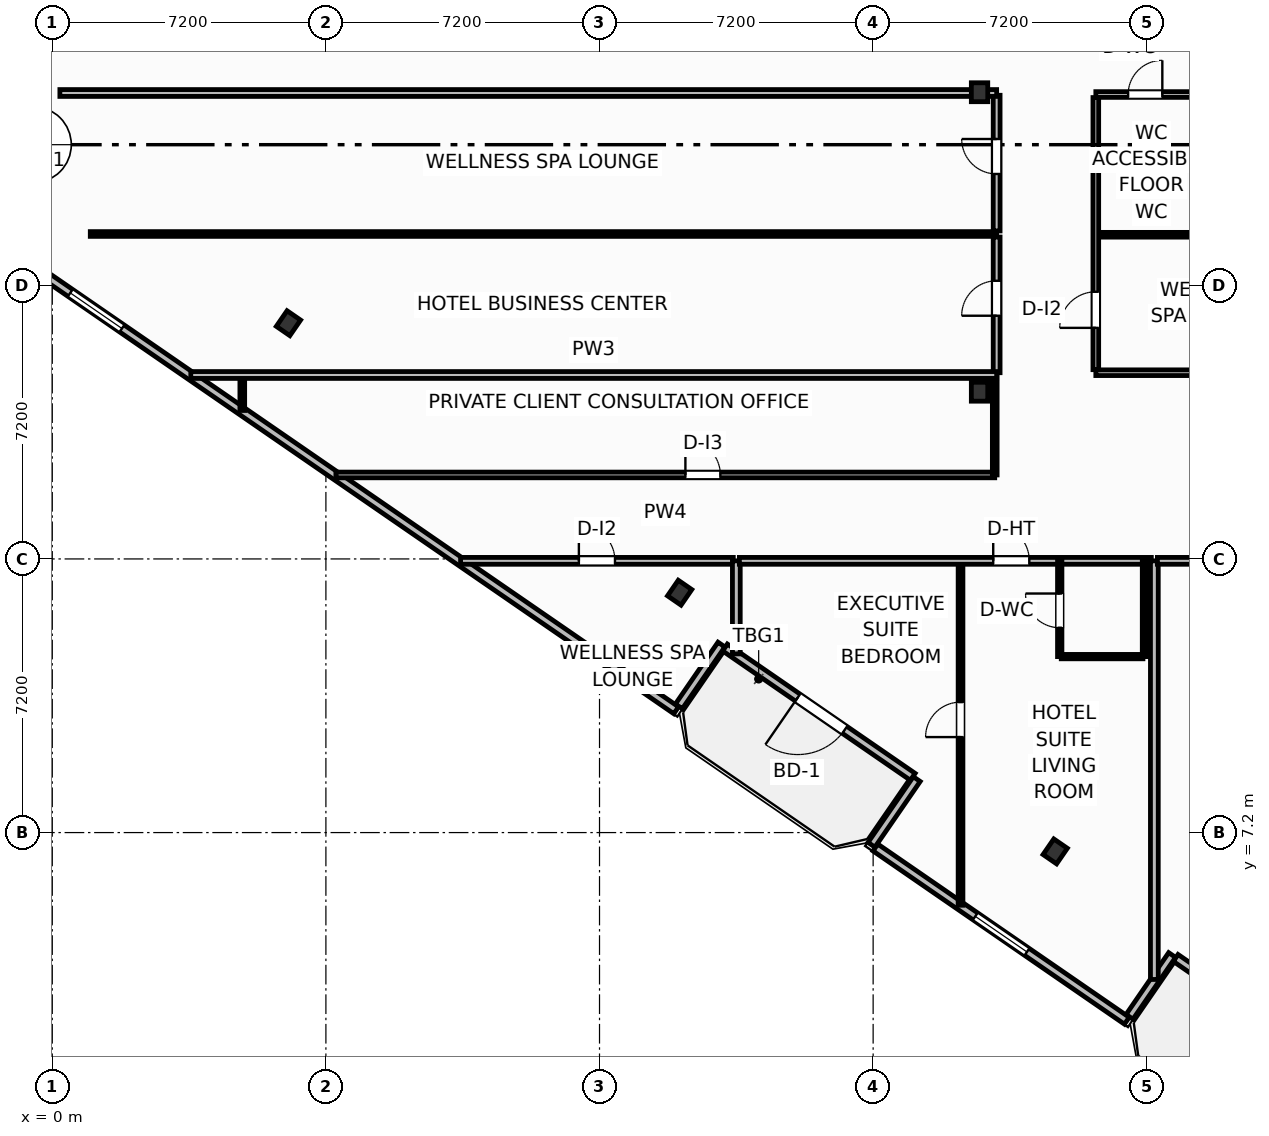
"""IFC4 building model, lengths in metres.
Left out: names, types, materials, properties, quantities, classifications, styles, units other than length and angle.
Written with IfcOpenShell. Run it as: python <this file> out.ifc"""

import sys

from ifc_helpers import new_model, si_unit, direction, frame, frame_2d, origin, origin_2d, place, context, subcontext, project, spatial, rectangle, i_section, extrude, element, fill, save


model = new_model("IFC4")
c1 = context("Model", 3, precision=1e-05, world=origin(), true_north=direction((0.0, 1.0)))
c2 = subcontext(c1, "Body", "Model", "MODEL_VIEW")
j1 = project(units=[si_unit("LENGTHUNIT", "METRE"), si_unit("PLANEANGLEUNIT", "RADIAN")], contexts=[c1])
p1 = place(None, origin())
s1 = spatial("IfcSite", under=j1, at=p1, CompositionType="ELEMENT")
p2 = place(p1, origin())
s2 = spatial("IfcBuilding", under=s1, at=p2, CompositionType="ELEMENT")
p3 = place(p2, frame((0.0, 0.0, 45.5)))
s3 = spatial("IfcBuildingStorey", under=s2, at=p3, CompositionType="ELEMENT", Elevation=45.5)
for number, where, z_axis, x_axis in (
    (1, (24.4, 18.8, 0.0), (0.0, 0.0, 1.0), (1.0, 0.0, 0.0)),
    (2, (24.4, 26.68, 0.0), (0.0, 0.0, 1.0), (1.0, 0.0, 0.0)),
    (3, (6.215, 20.603, 0.0), (0.0, 0.0, 1.0), (0.824, -0.567, 0.0)),
    (4, (16.509, 13.512, 0.0), (0.0, 0.0, 1.0), (0.824, -0.567, 0.0)),
    (5, (26.391, 6.705, 0.0), (0.0, 0.0, 1.0), (0.824, -0.567, 0.0)),
):
    element("IfcColumn", number, at=place(p3, frame(where, z_axis=z_axis, x_axis=x_axis)), inside=s3, PredefinedType="COLUMN", context=c2, shape_type="SweptSolid", body=[
        extrude(i_section(OverallWidth=0.432, OverallDepth=0.498, WebThickness=0.056, FlangeThickness=0.089, FilletRadius=0.025, at=origin_2d()), origin(), (0.0, 0.0, 1.0), 3.7),
    ])
p4 = place(p3, frame((22.643, 8.667, 0.0), z_axis=(0.0, 0.0, 1.0), x_axis=(-0.823534636215, 0.567265989598, 0.0)))
e6 = element("IfcWall", 6, at=p4, inside=s3, PredefinedType="SOLIDWALL", context=c2, shape_type="SweptSolid", body=[
    extrude(rectangle(XDim=6.0, YDim=0.22, at=frame_2d((3.0, 0.0))), origin(), (0.0, 0.0, 1.0), 2.73),
])
p5 = place(p4, frame((2.176, 0.0, 0.0)))
e7 = element("IfcOpeningElement", 7, at=p5, cuts=e6, PredefinedType="OPENING", context=c2, shape_type="SweptSolid", body=[
    extrude(rectangle(XDim=1.5, YDim=2.25, at=frame_2d((0.75, 1.125))), frame((0.0, 0.12, 0.0), z_axis=(0.0, -1.0, 0.0), x_axis=(1.0, 0.0, 0.0)), (0.0, 0.0, 1.0), 0.24),
])
p6 = place(p3, frame((34.502, 0.499, 0.0), z_axis=(0.0, 0.0, 1.0), x_axis=(-0.823534636215, 0.567265989598, 0.0)))
e8 = element("IfcWall", 8, at=p6, inside=s3, PredefinedType="SOLIDWALL", context=c2, shape_type="SweptSolid", body=[
    extrude(rectangle(XDim=6.0, YDim=0.22, at=frame_2d((3.0, 0.0))), origin(), (0.0, 0.0, 1.0), 2.73),
])
p7 = place(p6, frame((3.212, 0.0, 0.0)))
e9 = element("IfcOpeningElement", 9, at=p7, cuts=e8, PredefinedType="OPENING", context=c2, shape_type="SweptSolid", body=[
    extrude(rectangle(XDim=1.5, YDim=2.25, at=frame_2d((0.75, 1.125))), frame((0.0, 0.12, 0.0), z_axis=(0.0, -1.0, 0.0), x_axis=(1.0, 0.0, 0.0)), (0.0, 0.0, 1.0), 0.24),
])
p8 = place(p6, frame((0.55, 0.0, 0.75)))
e10 = element("IfcOpeningElement", 10, at=p8, cuts=e8, PredefinedType="OPENING", context=c2, shape_type="SweptSolid", body=[
    extrude(rectangle(XDim=1.65, YDim=1.65, at=frame_2d((0.825, 0.825))), frame((0.0, 0.12, 0.0), z_axis=(0.0, -1.0, 0.0), x_axis=(1.0, 0.0, 0.0)), (0.0, 0.0, 1.0), 0.24),
])
p9 = place(p3, frame((-2.728, 23.605, 0.0), z_axis=(0.0, 0.0, 1.0), x_axis=(0.823535075462, -0.567265351915, 0.0)))
e11 = element("IfcWall", 11, at=p9, inside=s3, PredefinedType="SOLIDWALL", context=c2, shape_type="SweptSolid", body=[
    extrude(rectangle(XDim=23.247, YDim=0.22, at=frame_2d((11.624, 0.0))), origin(), (0.0, 0.0, 1.0), 2.73),
])
p10 = place(p9, frame((3.887, 0.0, 0.8)))
e12 = element("IfcOpeningElement", 12, at=p10, cuts=e11, PredefinedType="OPENING", context=c2, shape_type="SweptSolid", body=[
    extrude(rectangle(XDim=1.65, YDim=1.65, at=frame_2d((0.825, 0.825))), frame((0.0, 0.12, 0.0), z_axis=(0.0, -1.0, 0.0), x_axis=(1.0, 0.0, 0.0)), (0.0, 0.0, 1.0), 0.24),
])
p11 = place(p3, frame((16.488, 10.521, 0.0), z_axis=(0.0, 0.0, 1.0), x_axis=(0.567131976434, 0.823626930902, 0.0)))
e13 = element("IfcWall", 13, at=p11, inside=s3, PredefinedType="SOLIDWALL", context=c2, shape_type="SweptSolid", body=[
    extrude(rectangle(XDim=1.975, YDim=0.22, at=frame_2d((0.988, 0.0))), origin(), (0.0, 0.0, 1.0), 2.73),
])
p12 = place(p3, frame((22.747, 8.607, 0.0), z_axis=(0.0, 0.0, 1.0), x_axis=(-0.567219383419, -0.823566737474, 0.0)))
e14 = element("IfcWall", 14, at=p12, inside=s3, PredefinedType="SOLIDWALL", context=c2, shape_type="SweptSolid", body=[
    extrude(rectangle(XDim=2.1, YDim=0.22, at=frame_2d((1.05, 0.0))), origin(), (0.0, 0.0, 1.0), 2.73),
])
p13 = place(p3, frame((21.659, 6.807, 0.0), z_axis=(0.0, 0.0, 1.0), x_axis=(0.823535360023, -0.567264938799, 0.0)))
e15 = element("IfcWall", 15, at=p13, inside=s3, PredefinedType="SOLIDWALL", context=c2, shape_type="SweptSolid", body=[
    extrude(rectangle(XDim=8.035, YDim=0.22, at=frame_2d((4.018, 0.0))), origin(), (0.0, 0.0, 1.0), 2.73),
])
p14 = place(p13, frame((3.192, 0.0, 0.8)))
e16 = element("IfcOpeningElement", 16, at=p14, cuts=e15, PredefinedType="OPENING", context=c2, shape_type="SweptSolid", body=[
    extrude(rectangle(XDim=1.65, YDim=1.65, at=frame_2d((0.825, 0.825))), frame((0.0, 0.12, 0.0), z_axis=(0.0, -1.0, 0.0), x_axis=(1.0, 0.0, 0.0)), (0.0, 0.0, 1.0), 0.24),
])
p15 = place(p3, frame((28.347, 2.352, 0.0), z_axis=(0.0, 0.0, 1.0), x_axis=(0.567215821234, 0.823569190865, 0.0)))
e17 = element("IfcWall", 17, at=p15, inside=s3, PredefinedType="SOLIDWALL", context=c2, shape_type="SweptSolid", body=[
    extrude(rectangle(XDim=1.975, YDim=0.22, at=frame_2d((0.988, 0.0))), origin(), (0.0, 0.0, 1.0), 2.73),
])
p16 = place(p3, frame((7.463, 16.61, 0.0), z_axis=(0.0, 0.0, 1.0), x_axis=(1.0, 0.0, 0.0)))
e18 = element("IfcWall", 18, at=p16, inside=s3, PredefinedType="PARTITIONING", context=c2, shape_type="SweptSolid", body=[
    extrude(rectangle(XDim=17.337, YDim=0.15, at=frame_2d((8.668, 0.0))), origin(), (0.0, 0.0, 1.0), 3.45),
])
p17 = place(p16, frame((9.197, 0.0, 0.0)))
e19 = element("IfcOpeningElement", 19, at=p17, cuts=e18, PredefinedType="OPENING", context=c2, shape_type="SweptSolid", body=[
    extrude(rectangle(XDim=0.92, YDim=2.05, at=frame_2d((0.46, 1.025))), frame((0.0, 0.085, 0.0), z_axis=(0.0, -1.0, 0.0), x_axis=(1.0, 0.0, 0.0)), (0.0, 0.0, 1.0), 0.17),
])
p18 = place(p3, frame((5.0, 18.306, 0.0), z_axis=(0.0, 0.0, 1.0), x_axis=(0.0, 1.0, 0.0)))
e20 = element("IfcWall", 20, at=p18, inside=s3, PredefinedType="PARTITIONING", context=c2, shape_type="SweptSolid", body=[
    extrude(rectangle(XDim=0.934, YDim=0.125, at=frame_2d((0.467, 0.0))), origin(), (0.0, 0.0, 1.0), 3.45),
])
p19 = place(p3, frame((24.8, 16.61, 0.0), z_axis=(0.0, 0.0, 1.0), x_axis=(0.0, 1.0, 0.0)))
e21 = element("IfcWall", 21, at=p19, inside=s3, PredefinedType="PARTITIONING", context=c2, shape_type="SweptSolid", body=[
    extrude(rectangle(XDim=2.63, YDim=0.125, at=frame_2d((1.315, 0.0))), origin(), (0.0, 0.0, 1.0), 2.58),
])
p20 = place(p3, frame((10.744, 14.35, 0.0), z_axis=(0.0, 0.0, 1.0), x_axis=(1.0, 0.0, 0.0)))
e22 = element("IfcWall", 22, at=p20, inside=s3, PredefinedType="PARTITIONING", context=c2, shape_type="SweptSolid", body=[
    extrude(rectangle(XDim=7.176, YDim=0.18, at=frame_2d((3.588, 0.0))), origin(), (0.0, 0.0, 1.0), 3.45),
])
p21 = place(p20, frame((3.113, 0.0, 0.0)))
e23 = element("IfcOpeningElement", 23, at=p21, cuts=e22, PredefinedType="OPENING", context=c2, shape_type="SweptSolid", body=[
    extrude(rectangle(XDim=0.95, YDim=2.05, at=frame_2d((0.475, 1.025))), frame((0.0, 0.1, 0.0), z_axis=(0.0, -1.0, 0.0), x_axis=(1.0, 0.0, 0.0)), (0.0, 0.0, 1.0), 0.2),
])
p22 = place(p3, frame((18.0, 11.902, 0.0), z_axis=(0.0, 0.0, 1.0), x_axis=(0.0, 1.0, 0.0)))
e24 = element("IfcWall", 24, at=p22, inside=s3, PredefinedType="PARTITIONING", context=c2, shape_type="SweptSolid", body=[
    extrude(rectangle(XDim=2.448, YDim=0.205, at=frame_2d((1.224, 0.0))), origin(), (0.0, 0.0, 1.0), 3.45),
])
p23 = place(p3, frame((23.9, 5.288, 0.0), z_axis=(0.0, 0.0, 1.0), x_axis=(0.0, 1.0, 0.0)))
e25 = element("IfcWall", 25, at=p23, inside=s3, PredefinedType="PARTITIONING", context=c2, shape_type="SweptSolid", body=[
    extrude(rectangle(XDim=9.062, YDim=0.125, at=frame_2d((4.531, 0.0))), origin(), (0.0, 0.0, 1.0), 3.45),
])
p24 = place(p23, frame((4.425, 0.0, 0.0)))
e26 = element("IfcOpeningElement", 26, at=p24, cuts=e25, PredefinedType="OPENING", context=c2, shape_type="SweptSolid", body=[
    extrude(rectangle(XDim=0.92, YDim=2.05, at=frame_2d((0.46, 1.025))), frame((0.0, 0.073, 0.0), z_axis=(0.0, -1.0, 0.0), x_axis=(1.0, 0.0, 0.0)), (0.0, 0.0, 1.0), 0.145),
])
p25 = place(p3, frame((18.08, 14.35, 0.0), z_axis=(0.0, 0.0, 1.0), x_axis=(1.0, 0.0, 0.0)))
e27 = element("IfcWall", 27, at=p25, inside=s3, PredefinedType="PARTITIONING", context=c2, shape_type="SweptSolid", body=[
    extrude(rectangle(XDim=10.84, YDim=0.18, at=frame_2d((5.42, 0.0))), origin(), (0.0, 0.0, 1.0), 3.45),
])
p26 = place(p25, frame((6.68, 0.0, 0.0)))
e28 = element("IfcOpeningElement", 28, at=p26, cuts=e27, PredefinedType="OPENING", context=c2, shape_type="SweptSolid", body=[
    extrude(rectangle(XDim=0.95, YDim=2.15, at=frame_2d((0.475, 1.075))), frame((0.0, 0.1, 0.0), z_axis=(0.0, -1.0, 0.0), x_axis=(1.0, 0.0, 0.0)), (0.0, 0.0, 1.0), 0.2),
])
p27 = place(p3, frame((26.55, 11.83, 0.0), z_axis=(0.0, 0.0, 1.0), x_axis=(1.0, 0.0, 0.0)))
e29 = element("IfcWall", 29, at=p27, inside=s3, PredefinedType="PARTITIONING", context=c2, shape_type="SweptSolid", body=[
    extrude(rectangle(XDim=2.15, YDim=0.115, at=frame_2d((1.075, 0.0))), origin(), (0.0, 0.0, 1.0), 3.45),
])
p28 = place(p3, frame((26.51, 11.83, 0.0), z_axis=(0.0, 0.0, 1.0), x_axis=(0.0, 1.0, 0.0)))
e30 = element("IfcWall", 30, at=p28, inside=s3, PredefinedType="PARTITIONING", context=c2, shape_type="SweptSolid", body=[
    extrude(rectangle(XDim=2.52, YDim=0.115, at=frame_2d((1.26, 0.0))), origin(), (0.0, 0.0, 1.0), 3.45),
])
p29 = place(p28, frame((0.76, 0.0, 0.0)))
e31 = element("IfcOpeningElement", 31, at=p29, cuts=e30, PredefinedType="OPENING", context=c2, shape_type="SweptSolid", body=[
    extrude(rectangle(XDim=0.9, YDim=2.05, at=frame_2d((0.45, 1.025))), frame((0.0, 0.067, 0.0), z_axis=(0.0, -1.0, 0.0), x_axis=(1.0, 0.0, 0.0)), (0.0, 0.0, 1.0), 0.135),
])
p30 = place(p3, frame((28.74, 11.83, 0.0), z_axis=(0.0, 0.0, 1.0), x_axis=(0.0, 1.0, 0.0)))
e32 = element("IfcWall", 32, at=p30, inside=s3, PredefinedType="PARTITIONING", context=c2, shape_type="SweptSolid", body=[
    extrude(rectangle(XDim=2.52, YDim=0.115, at=frame_2d((1.26, 0.0))), origin(), (0.0, 0.0, 1.0), 3.45),
])
p31 = place(p3, frame((29.0, 3.335, 0.0), z_axis=(0.0, 0.0, 1.0), x_axis=(0.0, 1.0, 0.0)))
e33 = element("IfcWall", 33, at=p31, inside=s3, PredefinedType="PARTITIONING", context=c2, shape_type="SweptSolid", body=[
    extrude(rectangle(XDim=11.015, YDim=0.205, at=frame_2d((5.507, 0.0))), origin(), (0.0, 0.0, 1.0), 3.45),
])
p32 = place(p3, frame((29.08, 14.35, 0.0), z_axis=(0.0, 0.0, 1.0), x_axis=(1.0, 0.0, 0.0)))
e34 = element("IfcWall", 34, at=p32, inside=s3, PredefinedType="PARTITIONING", context=c2, shape_type="SweptSolid", body=[
    extrude(rectangle(XDim=10.84, YDim=0.18, at=frame_2d((5.42, 0.0))), origin(), (0.0, 0.0, 1.0), 3.45),
])
p33 = place(p32, frame((0.926, 0.0, 0.0)))
e35 = element("IfcOpeningElement", 35, at=p33, cuts=e34, PredefinedType="OPENING", context=c2, shape_type="SweptSolid", body=[
    extrude(rectangle(XDim=0.95, YDim=2.15, at=frame_2d((0.475, 1.075))), frame((0.0, 0.1, 0.0), z_axis=(0.0, -1.0, 0.0), x_axis=(1.0, 0.0, 0.0)), (0.0, 0.0, 1.0), 0.2),
])
p34 = place(p3, frame((24.85, 19.3, 0.0), z_axis=(0.0, 0.0, 1.0), x_axis=(0.0, 1.0, 0.0)))
e36 = element("IfcWall", 36, at=p34, inside=s3, PredefinedType="PARTITIONING", context=c2, shape_type="SweptSolid", body=[
    extrude(rectangle(XDim=3.57, YDim=0.18, at=frame_2d((1.785, 0.0))), origin(), (0.0, 0.0, 1.0), 3.45),
])
p35 = place(p34, frame((1.5, 0.0, 0.0)))
e37 = element("IfcOpeningElement", 37, at=p35, cuts=e36, PredefinedType="OPENING", context=c2, shape_type="SweptSolid", body=[
    extrude(rectangle(XDim=0.92, YDim=2.05, at=frame_2d((0.46, 1.025))), frame((0.0, 0.1, 0.0), z_axis=(0.0, -1.0, 0.0), x_axis=(1.0, 0.0, 0.0)), (0.0, 0.0, 1.0), 0.2),
])
p36 = place(p3, frame((24.85, 23.03, 0.0), z_axis=(0.0, 0.0, 1.0), x_axis=(0.0, 1.0, 0.0)))
e38 = element("IfcWall", 38, at=p36, inside=s3, PredefinedType="PARTITIONING", context=c2, shape_type="SweptSolid", body=[
    extrude(rectangle(XDim=3.57, YDim=0.18, at=frame_2d((1.785, 0.0))), origin(), (0.0, 0.0, 1.0), 3.45),
])
p37 = place(p36, frame((1.5, 0.0, 0.0)))
e39 = element("IfcOpeningElement", 39, at=p37, cuts=e38, PredefinedType="OPENING", context=c2, shape_type="SweptSolid", body=[
    extrude(rectangle(XDim=0.92, YDim=2.05, at=frame_2d((0.46, 1.025))), frame((0.0, 0.1, 0.0), z_axis=(0.0, -1.0, 0.0), x_axis=(1.0, 0.0, 0.0)), (0.0, 0.0, 1.0), 0.2),
])
p38 = place(p3, frame((1.0, 22.95, 0.0), z_axis=(0.0, 0.0, 1.0), x_axis=(1.0, 0.0, 0.0)))
e40 = element("IfcWall", 40, at=p38, inside=s3, PredefinedType="PARTITIONING", context=c2, shape_type="SweptSolid", body=[
    extrude(rectangle(XDim=23.85, YDim=0.125, at=frame_2d((11.925, 0.0))), origin(), (0.0, 0.0, 1.0), 3.45),
])
p39 = place(p3, frame((3.645, 19.24, 0.0), z_axis=(0.0, 0.0, 1.0), x_axis=(1.0, 0.0, 0.0)))
e41 = element("IfcWall", 41, at=p39, inside=s3, PredefinedType="PARTITIONING", context=c2, shape_type="SweptSolid", body=[
    extrude(rectangle(XDim=21.205, YDim=0.18, at=frame_2d((10.603, 0.0))), origin(), (0.0, 0.0, 1.0), 2.58),
])
p40 = place(p3, frame((0.2, 26.66, 0.0), z_axis=(0.0, 0.0, 1.0), x_axis=(1.0, 0.0, 0.0)))
e42 = element("IfcWall", 42, at=p40, inside=s3, PredefinedType="PARTITIONING", context=c2, shape_type="SweptSolid", body=[
    extrude(rectangle(XDim=24.65, YDim=0.18, at=frame_2d((12.325, 0.0))), origin(), (0.0, 0.0, 1.0), 2.662),
])
p41 = place(p3, frame((27.46, 19.3, 0.0), z_axis=(0.0, 0.0, 1.0), x_axis=(1.0, 0.0, 0.0)))
e43 = element("IfcWall", 43, at=p41, inside=s3, PredefinedType="PARTITIONING", context=c2, shape_type="SweptSolid", body=[
    extrude(rectangle(XDim=6.1, YDim=0.15, at=frame_2d((3.05, 0.0))), origin(), (0.0, 0.0, 1.0), 2.662),
])
p42 = place(p3, frame((27.46, 26.62, 0.0), z_axis=(0.0, 0.0, 1.0), x_axis=(1.0, 0.0, 0.0)))
e44 = element("IfcWall", 44, at=p42, inside=s3, PredefinedType="PARTITIONING", context=c2, shape_type="SweptSolid", body=[
    extrude(rectangle(XDim=6.1, YDim=0.15, at=frame_2d((3.05, 0.0))), origin(), (0.0, 0.0, 1.0), 2.662),
])
p43 = place(p42, frame((0.85, 0.0, 0.0)))
e45 = element("IfcOpeningElement", 45, at=p43, cuts=e44, PredefinedType="OPENING", context=c2, shape_type="SweptSolid", body=[
    extrude(rectangle(XDim=0.9, YDim=2.05, at=frame_2d((0.45, 1.025))), frame((0.0, 0.085, 0.0), z_axis=(0.0, -1.0, 0.0), x_axis=(1.0, 0.0, 0.0)), (0.0, 0.0, 1.0), 0.17),
])
p44 = place(p42, frame((3.85, 0.0, 0.0)))
e46 = element("IfcOpeningElement", 46, at=p44, cuts=e44, PredefinedType="OPENING", context=c2, shape_type="SweptSolid", body=[
    extrude(rectangle(XDim=0.92, YDim=2.05, at=frame_2d((0.46, 1.025))), frame((0.0, 0.085, 0.0), z_axis=(0.0, -1.0, 0.0), x_axis=(1.0, 0.0, 0.0)), (0.0, 0.0, 1.0), 0.17),
])
p45 = place(p3, frame((27.52, 22.93, 0.0), z_axis=(0.0, 0.0, 1.0), x_axis=(1.0, 0.0, 0.0)))
e47 = element("IfcWall", 47, at=p45, inside=s3, PredefinedType="PARTITIONING", context=c2, shape_type="SweptSolid", body=[
    extrude(rectangle(XDim=6.0, YDim=0.125, at=frame_2d((3.0, 0.0))), origin(), (0.0, 0.0, 1.0), 3.45),
])
p46 = place(p3, frame((27.46, 19.38, 0.0), z_axis=(0.0, 0.0, 1.0), x_axis=(0.0, 1.0, 0.0)))
e48 = element("IfcWall", 48, at=p46, inside=s3, PredefinedType="PARTITIONING", context=c2, shape_type="SweptSolid", body=[
    extrude(rectangle(XDim=7.16, YDim=0.15, at=frame_2d((3.58, 0.0))), origin(), (0.0, 0.0, 1.0), 3.45),
])
p47 = place(p46, frame((1.1, 0.0, 0.0)))
e49 = element("IfcOpeningElement", 49, at=p47, cuts=e48, PredefinedType="OPENING", context=c2, shape_type="SweptSolid", body=[
    extrude(rectangle(XDim=0.95, YDim=2.05, at=frame_2d((0.475, 1.025))), frame((0.0, 0.085, 0.0), z_axis=(0.0, -1.0, 0.0), x_axis=(1.0, 0.0, 0.0)), (0.0, 0.0, 1.0), 0.17),
])
p48 = place(p5, origin())
e50 = element("IfcDoor", 50, at=p48, inside=s3, OperationType="SINGLE_SWING_RIGHT", PredefinedType="DOOR", context=c2, shape_type="SweptSolid", body=[
    extrude(rectangle(XDim=1.5, YDim=2.25, at=frame_2d((0.75, 1.125))), frame((0.0, 0.025, 0.0), z_axis=(0.0, -1.0, 0.0), x_axis=(1.0, 0.0, 0.0)), (0.0, 0.0, 1.0), 0.05),
])
fill(e7, e50)
p49 = place(p10, origin())
e51 = element("IfcWindow", 51, at=p49, inside=s3, PartitioningType="SINGLE_PANEL", PredefinedType="WINDOW", context=c2, shape_type="SweptSolid", body=[
    extrude(rectangle(XDim=1.65, YDim=1.65, at=frame_2d((0.825, 0.825))), frame((0.0, 0.03, 0.0), z_axis=(0.0, -1.0, 0.0), x_axis=(1.0, 0.0, 0.0)), (0.0, 0.0, 1.0), 0.06),
])
fill(e12, e51)
p50 = place(p14, origin())
e52 = element("IfcWindow", 52, at=p50, inside=s3, PartitioningType="SINGLE_PANEL", PredefinedType="WINDOW", context=c2, shape_type="SweptSolid", body=[
    extrude(rectangle(XDim=1.65, YDim=1.65, at=frame_2d((0.825, 0.825))), frame((0.0, 0.03, 0.0), z_axis=(0.0, -1.0, 0.0), x_axis=(1.0, 0.0, 0.0)), (0.0, 0.0, 1.0), 0.06),
])
fill(e16, e52)
p51 = place(p17, origin())
e53 = element("IfcDoor", 53, at=p51, inside=s3, OperationType="SINGLE_SWING_LEFT", PredefinedType="DOOR", context=c2, shape_type="SweptSolid", body=[
    extrude(rectangle(XDim=0.92, YDim=2.05, at=frame_2d((0.46, 1.025))), frame((0.0, 0.025, 0.0), z_axis=(0.0, -1.0, 0.0), x_axis=(1.0, 0.0, 0.0)), (0.0, 0.0, 1.0), 0.05),
])
fill(e19, e53)
p52 = place(p21, origin())
e54 = element("IfcDoor", 54, at=p52, inside=s3, OperationType="SINGLE_SWING_LEFT", PredefinedType="DOOR", context=c2, shape_type="SweptSolid", body=[
    extrude(rectangle(XDim=0.95, YDim=2.05, at=frame_2d((0.475, 1.025))), frame((0.0, 0.025, 0.0), z_axis=(0.0, -1.0, 0.0), x_axis=(1.0, 0.0, 0.0)), (0.0, 0.0, 1.0), 0.05),
])
fill(e23, e54)
p53 = place(p24, origin())
e55 = element("IfcDoor", 55, at=p53, inside=s3, OperationType="SINGLE_SWING_LEFT", PredefinedType="DOOR", context=c2, shape_type="SweptSolid", body=[
    extrude(rectangle(XDim=0.92, YDim=2.05, at=frame_2d((0.46, 1.025))), frame((0.0, 0.025, 0.0), z_axis=(0.0, -1.0, 0.0), x_axis=(1.0, 0.0, 0.0)), (0.0, 0.0, 1.0), 0.05),
])
fill(e26, e55)
p54 = place(p26, origin())
e56 = element("IfcDoor", 56, at=p54, inside=s3, OperationType="SINGLE_SWING_LEFT", PredefinedType="DOOR", context=c2, shape_type="SweptSolid", body=[
    extrude(rectangle(XDim=0.95, YDim=2.15, at=frame_2d((0.475, 1.075))), frame((0.0, 0.025, 0.0), z_axis=(0.0, -1.0, 0.0), x_axis=(1.0, 0.0, 0.0)), (0.0, 0.0, 1.0), 0.05),
])
fill(e28, e56)
p55 = place(p29, origin())
e57 = element("IfcDoor", 57, at=p55, inside=s3, OperationType="SINGLE_SWING_RIGHT", PredefinedType="DOOR", context=c2, shape_type="SweptSolid", body=[
    extrude(rectangle(XDim=0.9, YDim=2.05, at=frame_2d((0.45, 1.025))), frame((0.0, 0.025, 0.0), z_axis=(0.0, -1.0, 0.0), x_axis=(1.0, 0.0, 0.0)), (0.0, 0.0, 1.0), 0.05),
])
fill(e31, e57)
p56 = place(p35, origin())
e58 = element("IfcDoor", 58, at=p56, inside=s3, OperationType="SINGLE_SWING_LEFT", PredefinedType="DOOR", context=c2, shape_type="SweptSolid", body=[
    extrude(rectangle(XDim=0.92, YDim=2.05, at=frame_2d((0.46, 1.025))), frame((0.0, 0.025, 0.0), z_axis=(0.0, -1.0, 0.0), x_axis=(1.0, 0.0, 0.0)), (0.0, 0.0, 1.0), 0.05),
])
fill(e37, e58)
p57 = place(p37, origin())
e59 = element("IfcDoor", 59, at=p57, inside=s3, OperationType="SINGLE_SWING_RIGHT", PredefinedType="DOOR", context=c2, shape_type="SweptSolid", body=[
    extrude(rectangle(XDim=0.92, YDim=2.05, at=frame_2d((0.46, 1.025))), frame((0.0, 0.025, 0.0), z_axis=(0.0, -1.0, 0.0), x_axis=(1.0, 0.0, 0.0)), (0.0, 0.0, 1.0), 0.05),
])
fill(e39, e59)
p58 = place(p43, origin())
e60 = element("IfcDoor", 60, at=p58, inside=s3, OperationType="SINGLE_SWING_RIGHT", PredefinedType="DOOR", context=c2, shape_type="SweptSolid", body=[
    extrude(rectangle(XDim=0.9, YDim=2.05, at=frame_2d((0.45, 1.025))), frame((0.0, 0.025, 0.0), z_axis=(0.0, -1.0, 0.0), x_axis=(1.0, 0.0, 0.0)), (0.0, 0.0, 1.0), 0.05),
])
fill(e45, e60)
p59 = place(p47, origin())
e61 = element("IfcDoor", 61, at=p59, inside=s3, OperationType="SINGLE_SWING_LEFT", PredefinedType="DOOR", context=c2, shape_type="SweptSolid", body=[
    extrude(rectangle(XDim=0.95, YDim=2.05, at=frame_2d((0.475, 1.025))), frame((0.0, 0.025, 0.0), z_axis=(0.0, -1.0, 0.0), x_axis=(1.0, 0.0, 0.0)), (0.0, 0.0, 1.0), 0.05),
])
fill(e49, e61)
save(model, sys.argv[1])
